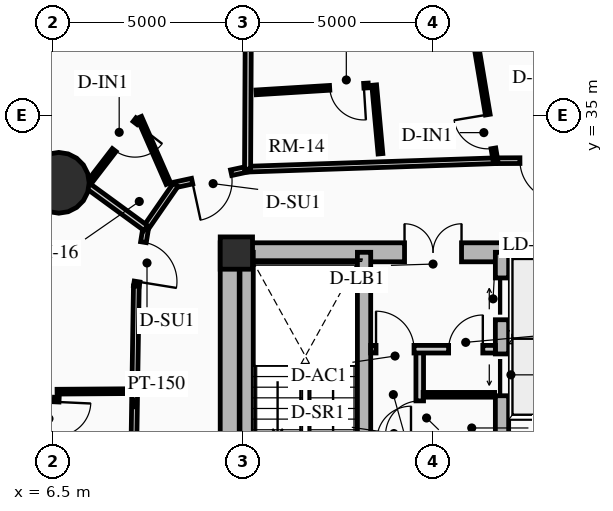
"""IFC4 building model, lengths in metres.
Left out: names, types, materials, properties, quantities, classifications, styles, units other than length and angle.
Written with IfcOpenShell. Run it as: python <this file> out.ifc"""

import sys

from ifc_helpers import new_model, si_unit, direction, frame, frame_2d, origin, origin_2d, place, context, subcontext, project, spatial, rectangle, circle, extrude, source, transform, mapped, element, fill, save


model = new_model("IFC4")
c1 = context("Model", 3, precision=1e-05, world=origin(), true_north=direction((0.0, 1.0)))
c2 = subcontext(c1, "Body", "Model", "MODEL_VIEW")
j1 = project(units=[si_unit("LENGTHUNIT", "METRE"), si_unit("PLANEANGLEUNIT", "RADIAN")], contexts=[c1])
p1 = place(None, origin())
s1 = spatial("IfcSite", under=j1, at=p1, CompositionType="ELEMENT")
p2 = place(p1, origin())
s2 = spatial("IfcBuilding", under=s1, at=p2, CompositionType="ELEMENT")
p3 = place(p2, frame((0.0, 0.0, 51.1)))
s3 = spatial("IfcBuildingStorey", under=s2, at=p3, CompositionType="ELEMENT", Elevation=51.1)
p4 = place(p3, frame((11.15, 17.35, 0.0), z_axis=(0.0, 0.0, 1.0), x_axis=(0.0, 1.0, 0.0)))
e1 = element("IfcWall", 1, at=p4, inside=s3, PredefinedType="SHEAR", context=c2, shape_type="SweptSolid", body=[
    extrude(rectangle(XDim=14.3, YDim=0.5, at=frame_2d((7.15, 0.0))), origin(), (0.0, 0.0, 1.0), 2.91),
])
p5 = place(p3, frame((11.15, 31.4, 0.0), z_axis=(0.0, 0.0, 1.0), x_axis=(1.0, 0.0, 0.0)))
e2 = element("IfcWall", 2, at=p5, inside=s3, PredefinedType="SHEAR", context=c2, shape_type="SweptSolid", body=[
    extrude(rectangle(XDim=10.7, YDim=0.5, at=frame_2d((5.35, 0.0))), origin(), (0.0, 0.0, 1.0), 2.91),
])
m1 = source(origin(), c2, "Body", "SweptSolid", [
    extrude(rectangle(XDim=1.5, YDim=2.02, at=frame_2d((0.75, 1.01))), frame((0.0, 0.26, 0.0), z_axis=(0.0, -1.0, 0.0), x_axis=(1.0, 0.0, 0.0)), (0.0, 0.0, 1.0), 0.52),
])
p6 = place(p5, frame((4.6, 0.0, 0.0)))
e3 = element("IfcOpeningElement", 3, at=p6, cuts=e2, PredefinedType="OPENING", context=c2, shape_type="MappedRepresentation", body=[
    mapped(m1, transform((0.0, 0.0, 0.0), x_axis=(1.0, 0.0, 0.0), y_axis=(0.0, 1.0, 0.0), z_axis=(0.0, 0.0, 1.0), scale=1.0)),
])
p7 = place(p3, frame((14.685, 17.6, 0.0), z_axis=(0.0, 0.0, 1.0), x_axis=(0.0, 1.0, 0.0)))
e4 = element("IfcWall", 4, at=p7, inside=s3, PredefinedType="SHEAR", context=c2, shape_type="SweptSolid", body=[
    extrude(rectangle(XDim=13.8, YDim=0.35, at=frame_2d((6.9, 0.0))), origin(), (0.0, 0.0, 1.0), 2.91),
])
m2 = source(origin(), c2, "Body", "SweptSolid", [
    extrude(rectangle(XDim=1.1, YDim=2.015, at=frame_2d((0.55, 1.007))), frame((0.0, 0.185, 0.0), z_axis=(0.0, -1.0, 0.0), x_axis=(1.0, 0.0, 0.0)), (0.0, 0.0, 1.0), 0.37),
])
p8 = place(p7, frame((4.9, 0.0, 0.0)))
e5 = element("IfcOpeningElement", 5, at=p8, cuts=e4, PredefinedType="OPENING", context=c2, shape_type="MappedRepresentation", body=[
    mapped(m2, transform((0.0, 0.0, 0.0), x_axis=(1.0, 0.0, 0.0), y_axis=(0.0, 1.0, 0.0), z_axis=(0.0, 0.0, 1.0), scale=1.0)),
])
m3 = source(origin(), c2, "Body", "SweptSolid", [
    extrude(rectangle(XDim=1.15, YDim=2.02, at=frame_2d((0.575, 1.01))), frame((0.0, 0.185, 0.0), z_axis=(0.0, -1.0, 0.0), x_axis=(1.0, 0.0, 0.0)), (0.0, 0.0, 1.0), 0.37),
])
p9 = place(p7, frame((7.32, 0.0, 0.0)))
e6 = element("IfcOpeningElement", 6, at=p9, cuts=e4, PredefinedType="OPENING", context=c2, shape_type="MappedRepresentation", body=[
    mapped(m3, transform((0.0, 0.0, 0.0), x_axis=(1.0, 0.0, 0.0), y_axis=(0.0, 1.0, 0.0), z_axis=(0.0, 0.0, 1.0), scale=1.0)),
])
p10 = place(p3, frame((18.315, 17.6, 0.0), z_axis=(0.0, 0.0, 1.0), x_axis=(0.0, 1.0, 0.0)))
e7 = element("IfcWall", 7, at=p10, inside=s3, PredefinedType="SHEAR", context=c2, shape_type="SweptSolid", body=[
    extrude(rectangle(XDim=13.8, YDim=0.35, at=frame_2d((6.9, 0.0))), origin(), (0.0, 0.0, 1.0), 2.91),
])
p11 = place(p10, frame((10.025, 0.0, 0.0)))
e8 = element("IfcOpeningElement", 8, at=p11, cuts=e7, PredefinedType="OPENING", context=c2, shape_type="MappedRepresentation", body=[
    mapped(m2, transform((0.0, 0.0, 0.0), x_axis=(1.0, 0.0, 0.0), y_axis=(0.0, 1.0, 0.0), z_axis=(0.0, 0.0, 1.0), scale=1.0)),
])
p12 = place(p10, frame((12.025, 0.0, 0.0)))
e9 = element("IfcOpeningElement", 9, at=p12, cuts=e7, PredefinedType="OPENING", context=c2, shape_type="MappedRepresentation", body=[
    mapped(m2, transform((0.0, 0.0, 0.0), x_axis=(1.0, 0.0, 0.0), y_axis=(0.0, 1.0, 0.0), z_axis=(0.0, 0.0, 1.0), scale=1.0)),
])
p13 = place(p10, frame((5.33, 0.0, 0.0)))
e10 = element("IfcOpeningElement", 10, at=p13, cuts=e7, PredefinedType="OPENING", context=c2, shape_type="MappedRepresentation", body=[
    mapped(m3, transform((0.0, 0.0, 0.0), x_axis=(1.0, 0.0, 0.0), y_axis=(0.0, 1.0, 0.0), z_axis=(0.0, 0.0, 1.0), scale=1.0)),
])
p14 = place(p3, frame((11.595, 24.655, 0.0), z_axis=(0.0, 0.0, 1.0), x_axis=(0.0, 1.0, 0.0)))
e11 = element("IfcWall", 11, at=p14, inside=s3, PredefinedType="SHEAR", context=c2, shape_type="SweptSolid", body=[
    extrude(rectangle(XDim=6.745, YDim=0.35, at=frame_2d((3.373, 0.0))), origin(), (0.0, 0.0, 1.0), 2.91),
])
p15 = place(p3, frame((11.325, 31.38, 0.0), z_axis=(0.0, 0.0, 1.0), x_axis=(1.0, 0.0, 0.0)))
e12 = element("IfcColumn", 12, at=p15, inside=s3, PredefinedType="COLUMN", context=c2, shape_type="SweptSolid", body=[
    extrude(rectangle(XDim=0.85, YDim=0.85, at=origin_2d()), origin(), (0.0, 0.0, 1.0), 2.91),
])
p16 = place(p3, frame((6.653, 33.229, 0.0), z_axis=(0.0, 0.0, 1.0), x_axis=(1.0, 0.0, 0.0)))
e13 = element("IfcColumn", 13, at=p16, inside=s3, PredefinedType="USERDEFINED", context=c2, shape_type="SweptSolid", body=[
    extrude(circle(Radius=0.8, at=origin_2d()), origin(), (0.0, 0.0, 1.0), 2.91),
])
p17 = place(p3, frame((3.828, 35.768, 0.0), z_axis=(0.0, 0.0, 1.0), x_axis=(0.632713287022, 0.77438614168, 0.0)))
e14 = element("IfcWall", 14, at=p17, inside=s3, PredefinedType="SOLIDWALL", context=c2, shape_type="SweptSolid", body=[
    extrude(rectangle(XDim=5.477, YDim=0.24, at=frame_2d((2.738, 0.0))), origin(), (0.0, 0.0, 1.0), 2.073),
])
m4 = source(origin(), c2, "Body", "SweptSolid", [
    extrude(rectangle(XDim=1.9, YDim=1.35, at=frame_2d((0.95, 0.675))), frame((0.0, 0.13, 0.0), z_axis=(0.0, -1.0, 0.0), x_axis=(1.0, 0.0, 0.0)), (0.0, 0.0, 1.0), 0.26),
])
p18 = place(p17, frame((1.788, 0.0, 0.65)))
e15 = element("IfcOpeningElement", 15, at=p18, cuts=e14, PredefinedType="OPENING", context=c2, shape_type="MappedRepresentation", body=[
    mapped(m4, transform((0.0, 0.0, 0.0), x_axis=(1.0, 0.0, 0.0), y_axis=(0.0, 1.0, 0.0), z_axis=(0.0, 0.0, 1.0), scale=1.0)),
])
for number, where, z_axis, x_axis in (
    (16, (18.51, 27.13, 0.0), (0.0, 0.0, 1.0), (1.0, 0.0, 0.0)),
    (17, (18.51, 29.175, 0.0), (0.0, 0.0, 1.0), (1.0, 0.0, 0.0)),
):
    element("IfcWall", number, at=place(p3, frame(where, z_axis=z_axis, x_axis=x_axis)), inside=s3, PredefinedType="SHEAR", context=c2, shape_type="SweptSolid", body=[
        extrude(rectangle(XDim=2.97, YDim=0.2, at=frame_2d((1.485, 0.0))), origin(), (0.0, 0.0, 1.0), 2.91),
    ])
p19 = place(p3, frame((16.15, 26.45, 0.0), z_axis=(0.0, 0.0, 1.0), x_axis=(0.0, 1.0, 0.0)))
e18 = element("IfcWall", 18, at=p19, inside=s3, PredefinedType="PARTITIONING", context=c2, shape_type="SweptSolid", body=[
    extrude(rectangle(XDim=2.4, YDim=0.2, at=frame_2d((1.2, 0.0))), origin(), (0.0, 0.0, 1.0), 2.635),
])
m5 = source(origin(), c2, "Body", "SweptSolid", [
    extrude(rectangle(XDim=0.9, YDim=2.005, at=frame_2d((0.45, 1.002))), frame((0.0, 0.11, 0.0), z_axis=(0.0, -1.0, 0.0), x_axis=(1.0, 0.0, 0.0)), (0.0, 0.0, 1.0), 0.22),
])
p20 = place(p19, frame((0.14, 0.0, 0.0)))
e19 = element("IfcOpeningElement", 19, at=p20, cuts=e18, PredefinedType="OPENING", context=c2, shape_type="MappedRepresentation", body=[
    mapped(m5, transform((0.0, 0.0, 0.0), x_axis=(1.0, 0.0, 0.0), y_axis=(0.0, 1.0, 0.0), z_axis=(0.0, 0.0, 1.0), scale=1.0)),
])
p21 = place(p3, frame((14.86, 28.85, 0.0), z_axis=(0.0, 0.0, 1.0), x_axis=(1.0, 0.0, 0.0)))
e20 = element("IfcWall", 20, at=p21, inside=s3, PredefinedType="PARTITIONING", context=c2, shape_type="SweptSolid", body=[
    extrude(rectangle(XDim=3.28, YDim=0.2, at=frame_2d((1.64, 0.0))), origin(), (0.0, 0.0, 1.0), 2.635),
])
m6 = source(origin(), c2, "Body", "SweptSolid", [
    extrude(rectangle(XDim=1.0, YDim=2.015, at=frame_2d((0.5, 1.007))), frame((0.0, 0.11, 0.0), z_axis=(0.0, -1.0, 0.0), x_axis=(1.0, 0.0, 0.0)), (0.0, 0.0, 1.0), 0.22),
])
p22 = place(p21, frame((0.14, 0.0, 0.0)))
e21 = element("IfcOpeningElement", 21, at=p22, cuts=e20, PredefinedType="OPENING", context=c2, shape_type="MappedRepresentation", body=[
    mapped(m6, transform((0.0, 0.0, 0.0), x_axis=(1.0, 0.0, 0.0), y_axis=(0.0, 1.0, 0.0), z_axis=(0.0, 0.0, 1.0), scale=1.0)),
])
p23 = place(p21, frame((2.05, 0.0, 0.0)))
e22 = element("IfcOpeningElement", 22, at=p23, cuts=e20, PredefinedType="OPENING", context=c2, shape_type="MappedRepresentation", body=[
    mapped(m5, transform((0.0, 0.0, 0.0), x_axis=(1.0, 0.0, 0.0), y_axis=(0.0, 1.0, 0.0), z_axis=(0.0, 0.0, 1.0), scale=1.0)),
])
p24 = place(p3, frame((16.24, 27.65, 0.0), z_axis=(0.0, 0.0, 1.0), x_axis=(1.0, 0.0, 0.0)))
e23 = element("IfcWall", 23, at=p24, inside=s3, PredefinedType="PARTITIONING", context=c2, shape_type="SweptSolid", body=[
    extrude(rectangle(XDim=1.88, YDim=0.125, at=frame_2d((0.94, 0.0))), origin(), (0.0, 0.0, 1.0), 2.635),
])
p25 = place(p3, frame((21.527, 33.824, 0.0), z_axis=(0.0, 0.0, 1.0), x_axis=(-0.999990631344, -0.00432865146, 0.0)))
e24 = element("IfcWall", 24, at=p25, inside=s3, PredefinedType="PARTITIONING", context=c2, shape_type="SweptSolid", body=[
    extrude(rectangle(XDim=3.384, YDim=0.15, at=frame_2d((1.692, 0.0))), origin(), (0.0, 0.0, 1.0), 2.159),
])
m7 = source(origin(), c2, "Body", "SweptSolid", [
    extrude(rectangle(XDim=1.05, YDim=2.015, at=frame_2d((0.525, 1.007))), frame((0.0, 0.085, 0.0), z_axis=(0.0, -1.0, 0.0), x_axis=(1.0, 0.0, 0.0)), (0.0, 0.0, 1.0), 0.17),
])
p26 = place(p25, frame((1.69, 0.0, 0.0)))
e25 = element("IfcOpeningElement", 25, at=p26, cuts=e24, PredefinedType="OPENING", context=c2, shape_type="MappedRepresentation", body=[
    mapped(m7, transform((0.0, 0.0, 0.0), x_axis=(1.0, 0.0, 0.0), y_axis=(0.0, 1.0, 0.0), z_axis=(0.0, 0.0, 1.0), scale=1.0)),
])
p27 = place(p3, frame((18.143, 33.81, 0.0), z_axis=(0.0, 0.0, 1.0), x_axis=(-0.999423023908, -0.033964971394, 0.0)))
e26 = element("IfcWall", 26, at=p27, inside=s3, PredefinedType="PARTITIONING", context=c2, shape_type="SweptSolid", body=[
    extrude(rectangle(XDim=6.527, YDim=0.15, at=frame_2d((3.263, 0.0))), origin(), (0.0, 0.0, 1.0), 2.159),
])
p28 = place(p3, frame((11.62, 33.588, 0.0), z_axis=(0.0, 0.0, 1.0), x_axis=(-0.977392314559, -0.211433827571, 0.0)))
e27 = element("IfcWall", 27, at=p28, inside=s3, PredefinedType="PARTITIONING", context=c2, shape_type="SweptSolid", body=[
    extrude(rectangle(XDim=1.934, YDim=0.15, at=frame_2d((0.967, 0.0))), origin(), (0.0, 0.0, 1.0), 2.159),
])
p29 = place(p28, frame((0.442, 0.0, 0.0)))
e28 = element("IfcOpeningElement", 28, at=p29, cuts=e27, PredefinedType="OPENING", context=c2, shape_type="MappedRepresentation", body=[
    mapped(m7, transform((0.0, 0.0, 0.0), x_axis=(1.0, 0.0, 0.0), y_axis=(0.0, 1.0, 0.0), z_axis=(0.0, 0.0, 1.0), scale=1.0)),
])
p30 = place(p3, frame((9.729, 33.179, 0.0), z_axis=(0.0, 0.0, 1.0), x_axis=(-0.569155068352, -0.822230203878, 0.0)))
e29 = element("IfcWall", 29, at=p30, inside=s3, PredefinedType="PARTITIONING", context=c2, shape_type="SweptSolid", body=[
    extrude(rectangle(XDim=1.387, YDim=0.15, at=frame_2d((0.694, 0.0))), origin(), (0.0, 0.0, 1.0), 2.159),
])
p31 = place(p3, frame((8.94, 32.038, 0.0), z_axis=(0.0, 0.0, 1.0), x_axis=(-0.159917336462, -0.987130409571, 0.0)))
e30 = element("IfcWall", 30, at=p31, inside=s3, PredefinedType="PARTITIONING", context=c2, shape_type="SweptSolid", body=[
    extrude(rectangle(XDim=1.547, YDim=0.15, at=frame_2d((0.773, 0.0))), origin(), (0.0, 0.0, 1.0), 2.205),
])
p32 = place(p31, frame((0.377, 0.0, 0.0)))
e31 = element("IfcOpeningElement", 31, at=p32, cuts=e30, PredefinedType="OPENING", context=c2, shape_type="MappedRepresentation", body=[
    mapped(m7, transform((0.0, 0.0, 0.0), x_axis=(1.0, 0.0, 0.0), y_axis=(0.0, 1.0, 0.0), z_axis=(0.0, 0.0, 1.0), scale=1.0)),
])
p33 = place(p3, frame((8.693, 30.512, 0.0), z_axis=(0.0, 0.0, 1.0), x_axis=(-0.015389665197, -0.99988157209, 0.0)))
e32 = element("IfcWall", 32, at=p33, inside=s3, PredefinedType="PARTITIONING", context=c2, shape_type="SweptSolid", body=[
    extrude(rectangle(XDim=6.012, YDim=0.15, at=frame_2d((3.006, 0.0))), origin(), (0.0, 0.0, 1.0), 2.635),
])
p34 = place(p3, frame((11.62, 33.588, 0.0), z_axis=(0.0, 0.0, 1.0), x_axis=(0.005056791532, 0.999987214348, 0.0)))
e33 = element("IfcWall", 33, at=p34, inside=s3, PredefinedType="PARTITIONING", context=c2, shape_type="SweptSolid", body=[
    extrude(rectangle(XDim=9.125, YDim=0.16, at=frame_2d((4.562, 0.0))), origin(), (0.0, 0.0, 1.0), 2.073),
])
p35 = place(p3, frame((8.94, 32.038, 0.0), z_axis=(0.0, 0.0, 1.0), x_axis=(-0.807831293846, 0.58941377714, 0.0)))
e34 = element("IfcWall", 34, at=p35, inside=s3, PredefinedType="PARTITIONING", context=c2, shape_type="SweptSolid", body=[
    extrude(rectangle(XDim=6.308, YDim=0.16, at=frame_2d((3.154, 0.0))), origin(), (0.0, 0.0, 1.0), 2.073),
])
p36 = place(p3, frame((18.143, 33.81, 0.0), z_axis=(0.0, 0.0, 1.0), x_axis=(-0.164668829219, 0.986348912243, 0.0)))
e35 = element("IfcWall", 35, at=p36, inside=s3, PredefinedType="PARTITIONING", context=c2, shape_type="SweptSolid", body=[
    extrude(rectangle(XDim=9.977, YDim=0.125, at=frame_2d((4.988, 0.0))), origin(), (0.0, 0.0, 1.0), 2.073),
])
m8 = source(origin(), c2, "Body", "SweptSolid", [
    extrude(rectangle(XDim=0.9, YDim=2.005, at=frame_2d((0.45, 1.002))), frame((0.0, 0.073, 0.0), z_axis=(0.0, -1.0, 0.0), x_axis=(1.0, 0.0, 0.0)), (0.0, 0.0, 1.0), 0.145),
])
p37 = place(p36, frame((0.33, 0.0, 0.0)))
e36 = element("IfcOpeningElement", 36, at=p37, cuts=e35, PredefinedType="OPENING", context=c2, shape_type="MappedRepresentation", body=[
    mapped(m8, transform((0.0, 0.0, 0.0), x_axis=(1.0, 0.0, 0.0), y_axis=(0.0, 1.0, 0.0), z_axis=(0.0, 0.0, 1.0), scale=1.0)),
])
p38 = place(p3, frame((15.116, 33.993, 0.0), z_axis=(0.0, 0.0, 1.0), x_axis=(-0.090547877021, 0.995892103577, 0.0)))
e37 = element("IfcWall", 37, at=p38, inside=s3, PredefinedType="PARTITIONING", context=c2, shape_type="SweptSolid", body=[
    extrude(rectangle(XDim=1.815, YDim=0.125, at=frame_2d((0.907, 0.0))), origin(), (0.0, 0.0, 1.0), 2.635),
])
p39 = place(p3, frame((14.798, 35.791, 0.0), z_axis=(0.0, 0.0, 1.0), x_axis=(-0.998108365817, -0.06147918417, 0.0)))
e38 = element("IfcWall", 38, at=p39, inside=s3, PredefinedType="PARTITIONING", context=c2, shape_type="SweptSolid", body=[
    extrude(rectangle(XDim=2.958, YDim=0.125, at=frame_2d((1.479, 0.0))), origin(), (0.0, 0.0, 1.0), 2.159),
])
p40 = place(p39, frame((0.12, 0.0, 0.0)))
e39 = element("IfcOpeningElement", 39, at=p40, cuts=e38, PredefinedType="OPENING", context=c2, shape_type="MappedRepresentation", body=[
    mapped(m8, transform((0.0, 0.0, 0.0), x_axis=(1.0, 0.0, 0.0), y_axis=(0.0, 1.0, 0.0), z_axis=(0.0, 0.0, 1.0), scale=1.0)),
])
p41 = place(p3, frame((9.535, 33.211, 0.0), z_axis=(0.0, 0.0, 1.0), x_axis=(-0.401687955793, 0.915776602765, 0.0)))
e40 = element("IfcWall", 40, at=p41, inside=s3, PredefinedType="PARTITIONING", context=c2, shape_type="SweptSolid", body=[
    extrude(rectangle(XDim=1.901, YDim=0.125, at=frame_2d((0.95, 0.0))), origin(), (0.0, 0.0, 1.0), 2.635),
])
p42 = place(p3, frame((8.732, 34.899, 0.0), z_axis=(0.0, 0.0, 1.0), x_axis=(-0.609677010074, -0.792649950096, 0.0)))
e41 = element("IfcWall", 41, at=p42, inside=s3, PredefinedType="PARTITIONING", context=c2, shape_type="SweptSolid", body=[
    extrude(rectangle(XDim=2.097, YDim=0.125, at=frame_2d((1.049, 0.0))), origin(), (0.0, 0.0, 1.0), 2.073),
])
p43 = place(p42, frame((0.12, 0.0, 0.0)))
e42 = element("IfcOpeningElement", 42, at=p43, cuts=e41, PredefinedType="OPENING", context=c2, shape_type="MappedRepresentation", body=[
    mapped(m8, transform((0.0, 0.0, 0.0), x_axis=(1.0, 0.0, 0.0), y_axis=(0.0, 1.0, 0.0), z_axis=(0.0, 0.0, 1.0), scale=1.0)),
])
p44 = place(p3, frame((8.429, 27.745, 0.0), z_axis=(0.0, 0.0, 1.0), x_axis=(-0.999976632219, -0.006836301373, 0.0)))
e43 = element("IfcWall", 43, at=p44, inside=s3, PredefinedType="PARTITIONING", context=c2, shape_type="SweptSolid", body=[
    extrude(rectangle(XDim=1.821, YDim=0.125, at=frame_2d((0.911, 0.0))), origin(), (0.0, 0.0, 1.0), 2.635),
])
p45 = place(p3, frame((6.6, 27.583, 0.0), z_axis=(0.0, 0.0, 1.0), x_axis=(-0.046516553412, -0.998917519247, 0.0)))
e44 = element("IfcWall", 44, at=p45, inside=s3, PredefinedType="PARTITIONING", context=c2, shape_type="SweptSolid", body=[
    extrude(rectangle(XDim=2.876, YDim=0.125, at=frame_2d((1.438, 0.0))), origin(), (0.0, 0.0, 1.0), 2.635),
])
p46 = place(p45, frame((0.12, 0.0, 0.0)))
e45 = element("IfcOpeningElement", 45, at=p46, cuts=e44, PredefinedType="OPENING", context=c2, shape_type="MappedRepresentation", body=[
    mapped(m8, transform((0.0, 0.0, 0.0), x_axis=(1.0, 0.0, 0.0), y_axis=(0.0, 1.0, 0.0), z_axis=(0.0, 0.0, 1.0), scale=1.0)),
])
m9 = source(origin(), c2, "Body", "SweptSolid", [
    extrude(rectangle(XDim=1.1, YDim=2.015, at=frame_2d((0.55, 1.007))), frame((0.0, 0.025, 0.0), z_axis=(0.0, -1.0, 0.0), x_axis=(1.0, 0.0, 0.0)), (0.0, 0.0, 1.0), 0.05),
])
p47 = place(p11, origin())
e46 = element("IfcDoor", 46, at=p47, inside=s3, OperationType="SLIDING_TO_LEFT", PredefinedType="DOOR", context=c2, shape_type="MappedRepresentation", body=[
    mapped(m9, transform((0.0, 0.0, 0.0), x_axis=(1.0, 0.0, 0.0), y_axis=(0.0, 1.0, 0.0), z_axis=(0.0, 0.0, 1.0), scale=1.0)),
])
fill(e8, e46)
p48 = place(p12, origin())
e47 = element("IfcDoor", 47, at=p48, inside=s3, OperationType="SLIDING_TO_RIGHT", PredefinedType="DOOR", context=c2, shape_type="MappedRepresentation", body=[
    mapped(m9, transform((0.0, 0.0, 0.0), x_axis=(1.0, 0.0, 0.0), y_axis=(0.0, 1.0, 0.0), z_axis=(0.0, 0.0, 1.0), scale=1.0)),
])
fill(e9, e47)
m10 = source(origin(), c2, "Body", "SweptSolid", [
    extrude(rectangle(XDim=1.5, YDim=2.02, at=frame_2d((0.75, 1.01))), frame((0.0, 0.025, 0.0), z_axis=(0.0, -1.0, 0.0), x_axis=(1.0, 0.0, 0.0)), (0.0, 0.0, 1.0), 0.05),
])
p49 = place(p6, origin())
e48 = element("IfcDoor", 48, at=p49, inside=s3, OperationType="DOUBLE_DOOR_SINGLE_SWING", PredefinedType="DOOR", context=c2, shape_type="MappedRepresentation", body=[
    mapped(m10, transform((0.0, 0.0, 0.0), x_axis=(1.0, 0.0, 0.0), y_axis=(0.0, 1.0, 0.0), z_axis=(0.0, 0.0, 1.0), scale=1.0)),
])
fill(e3, e48)
m11 = source(origin(), c2, "Body", "SweptSolid", [
    extrude(rectangle(XDim=1.0, YDim=2.015, at=frame_2d((0.5, 1.007))), frame((0.0, 0.025, 0.0), z_axis=(0.0, -1.0, 0.0), x_axis=(1.0, 0.0, 0.0)), (0.0, 0.0, 1.0), 0.05),
])
p50 = place(p22, origin())
e49 = element("IfcDoor", 49, at=p50, inside=s3, OperationType="SINGLE_SWING_LEFT", PredefinedType="DOOR", context=c2, shape_type="MappedRepresentation", body=[
    mapped(m11, transform((0.0, 0.0, 0.0), x_axis=(1.0, 0.0, 0.0), y_axis=(0.0, 1.0, 0.0), z_axis=(0.0, 0.0, 1.0), scale=1.0)),
])
fill(e21, e49)
m12 = source(origin(), c2, "Body", "SweptSolid", [
    extrude(rectangle(XDim=0.9, YDim=2.005, at=frame_2d((0.45, 1.002))), frame((0.0, 0.025, 0.0), z_axis=(0.0, -1.0, 0.0), x_axis=(1.0, 0.0, 0.0)), (0.0, 0.0, 1.0), 0.05),
])
p51 = place(p20, origin())
e50 = element("IfcDoor", 50, at=p51, inside=s3, OperationType="SINGLE_SWING_LEFT", PredefinedType="DOOR", context=c2, shape_type="MappedRepresentation", body=[
    mapped(m12, transform((0.0, 0.0, 0.0), x_axis=(1.0, 0.0, 0.0), y_axis=(0.0, 1.0, 0.0), z_axis=(0.0, 0.0, 1.0), scale=1.0)),
])
fill(e19, e50)
p52 = place(p23, origin())
e51 = element("IfcDoor", 51, at=p52, inside=s3, OperationType="SINGLE_SWING_RIGHT", PredefinedType="DOOR", context=c2, shape_type="MappedRepresentation", body=[
    mapped(m12, transform((0.0, 0.0, 0.0), x_axis=(1.0, 0.0, 0.0), y_axis=(0.0, 1.0, 0.0), z_axis=(0.0, 0.0, 1.0), scale=1.0)),
])
fill(e22, e51)
m13 = source(origin(), c2, "Body", "SweptSolid", [
    extrude(rectangle(XDim=1.05, YDim=2.015, at=frame_2d((0.525, 1.007))), frame((0.0, 0.025, 0.0), z_axis=(0.0, -1.0, 0.0), x_axis=(1.0, 0.0, 0.0)), (0.0, 0.0, 1.0), 0.05),
])
p53 = place(p26, origin())
e52 = element("IfcDoor", 52, at=p53, inside=s3, OperationType="SINGLE_SWING_LEFT", PredefinedType="DOOR", context=c2, shape_type="MappedRepresentation", body=[
    mapped(m13, transform((0.0, 0.0, 0.0), x_axis=(1.0, 0.0, 0.0), y_axis=(0.0, 1.0, 0.0), z_axis=(0.0, 0.0, 1.0), scale=1.0)),
])
fill(e25, e52)
p54 = place(p37, origin())
e53 = element("IfcDoor", 53, at=p54, inside=s3, OperationType="SINGLE_SWING_RIGHT", PredefinedType="DOOR", context=c2, shape_type="MappedRepresentation", body=[
    mapped(m12, transform((0.0, 0.0, 0.0), x_axis=(1.0, 0.0, 0.0), y_axis=(0.0, 1.0, 0.0), z_axis=(0.0, 0.0, 1.0), scale=1.0)),
])
fill(e36, e53)
p55 = place(p40, origin())
e54 = element("IfcDoor", 54, at=p55, inside=s3, OperationType="SINGLE_SWING_LEFT", PredefinedType="DOOR", context=c2, shape_type="MappedRepresentation", body=[
    mapped(m12, transform((0.0, 0.0, 0.0), x_axis=(1.0, 0.0, 0.0), y_axis=(0.0, 1.0, 0.0), z_axis=(0.0, 0.0, 1.0), scale=1.0)),
])
fill(e39, e54)
p56 = place(p29, origin())
e55 = element("IfcDoor", 55, at=p56, inside=s3, OperationType="SINGLE_SWING_RIGHT", PredefinedType="DOOR", context=c2, shape_type="MappedRepresentation", body=[
    mapped(m13, transform((0.0, 0.0, 0.0), x_axis=(1.0, 0.0, 0.0), y_axis=(0.0, 1.0, 0.0), z_axis=(0.0, 0.0, 1.0), scale=1.0)),
])
fill(e28, e55)
p57 = place(p43, origin())
e56 = element("IfcDoor", 56, at=p57, inside=s3, OperationType="SINGLE_SWING_LEFT", PredefinedType="DOOR", context=c2, shape_type="MappedRepresentation", body=[
    mapped(m12, transform((0.0, 0.0, 0.0), x_axis=(1.0, 0.0, 0.0), y_axis=(0.0, 1.0, 0.0), z_axis=(0.0, 0.0, 1.0), scale=1.0)),
])
fill(e42, e56)
p58 = place(p32, origin())
e57 = element("IfcDoor", 57, at=p58, inside=s3, OperationType="SINGLE_SWING_RIGHT", PredefinedType="DOOR", context=c2, shape_type="MappedRepresentation", body=[
    mapped(m13, transform((0.0, 0.0, 0.0), x_axis=(1.0, 0.0, 0.0), y_axis=(0.0, 1.0, 0.0), z_axis=(0.0, 0.0, 1.0), scale=1.0)),
])
fill(e31, e57)
p59 = place(p46, origin())
e58 = element("IfcDoor", 58, at=p59, inside=s3, OperationType="SINGLE_SWING_LEFT", PredefinedType="DOOR", context=c2, shape_type="MappedRepresentation", body=[
    mapped(m12, transform((0.0, 0.0, 0.0), x_axis=(1.0, 0.0, 0.0), y_axis=(0.0, 1.0, 0.0), z_axis=(0.0, 0.0, 1.0), scale=1.0)),
])
fill(e45, e58)
save(model, sys.argv[1])
